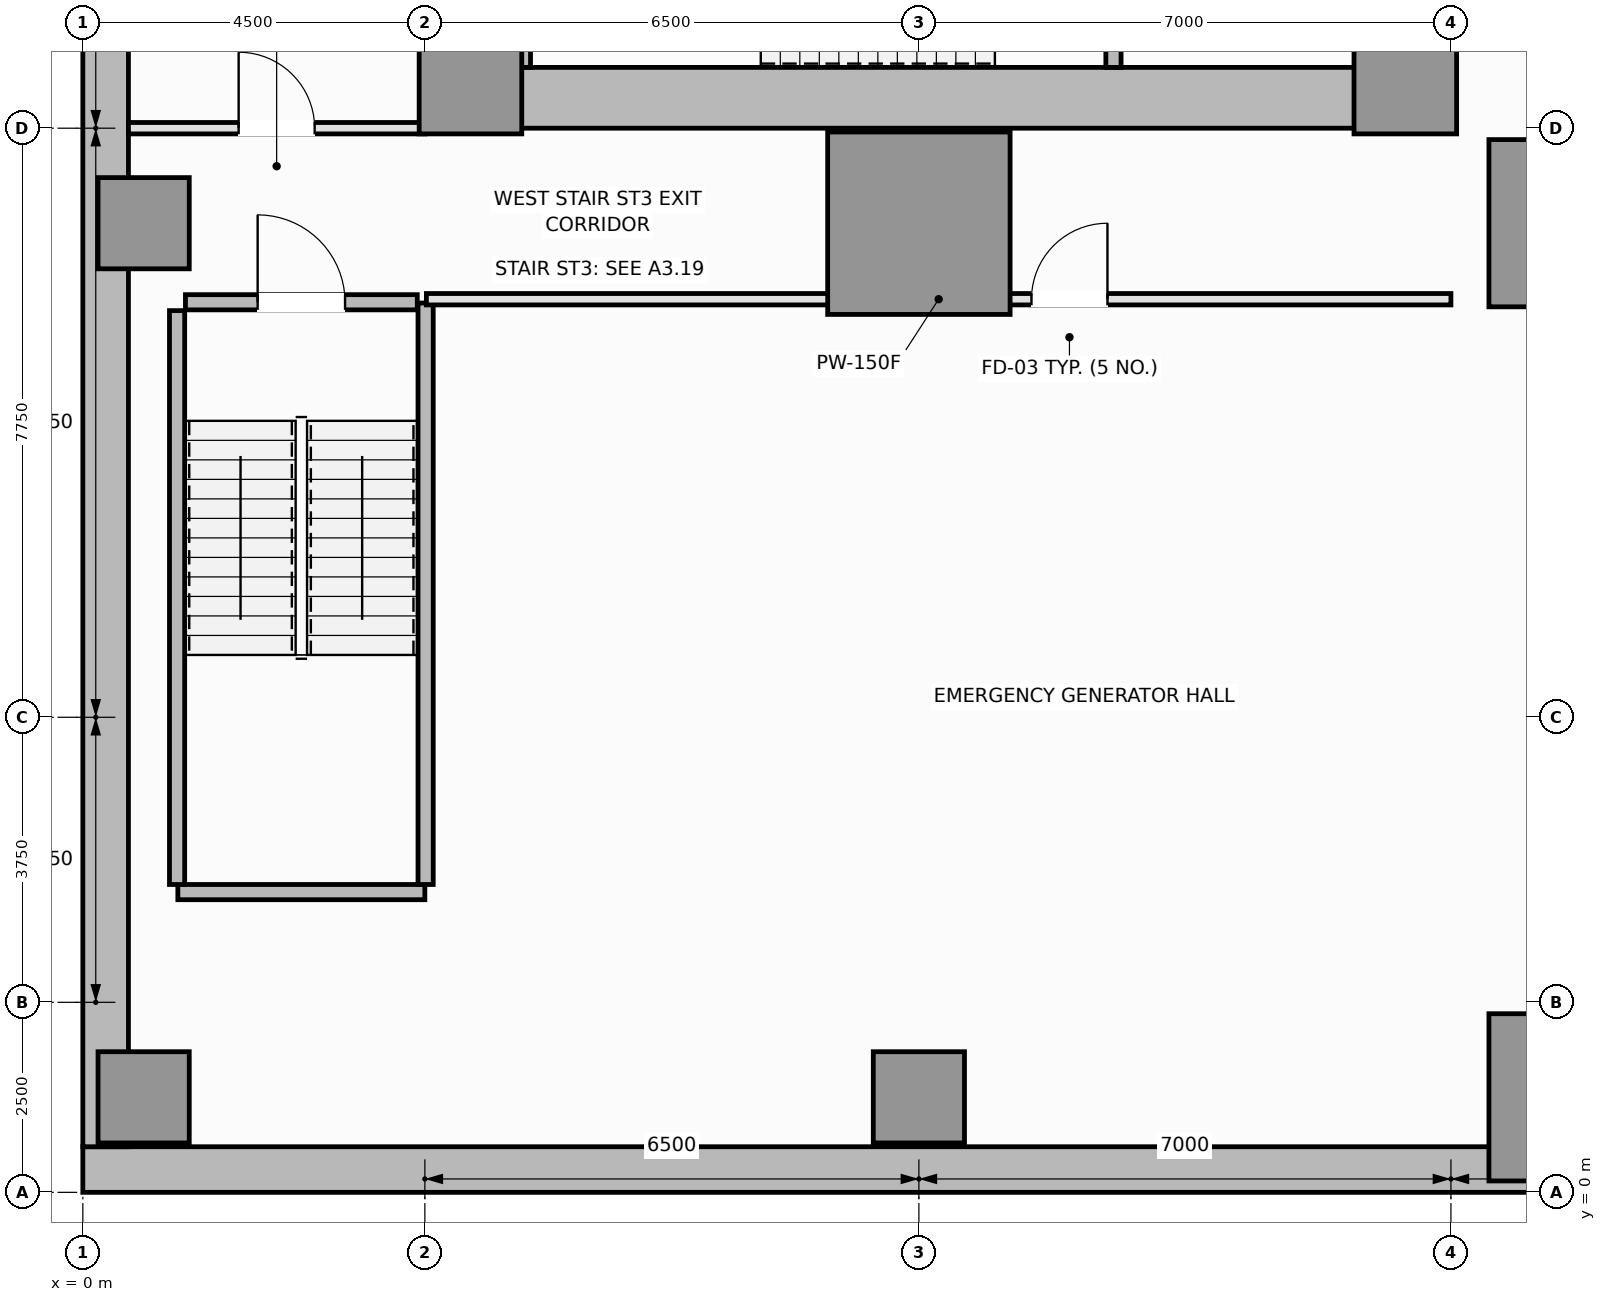
"""IFC4 building model, lengths in metres.
Left out: names, types, materials, properties, quantities, classifications, styles, units other than length and angle.
Written with IfcOpenShell. Run it as: python <this file> out.ifc"""

import sys

from ifc_helpers import new_model, si_unit, direction, frame, frame_2d, origin, origin_2d, place, context, subcontext, project, spatial, rectangle, extrude, element, fill, save


model = new_model("IFC4")
c1 = context("Model", 3, precision=1e-05, world=origin(), true_north=direction((0.0, 1.0)))
c2 = subcontext(c1, "Body", "Model", "MODEL_VIEW")
j1 = project(units=[si_unit("LENGTHUNIT", "METRE"), si_unit("PLANEANGLEUNIT", "RADIAN")], contexts=[c1])
p1 = place(None, origin())
s1 = spatial("IfcSite", under=j1, at=p1, CompositionType="ELEMENT")
p2 = place(p1, origin())
s2 = spatial("IfcBuilding", under=s1, at=p2, CompositionType="ELEMENT")
p3 = place(p2, frame((0.0, 0.0, -13.2)))
s3 = spatial("IfcBuildingStorey", under=s2, at=p3, CompositionType="ELEMENT", Elevation=-13.2)
p4 = place(p3, frame((0.0, 0.3, 0.0), z_axis=(0.0, 0.0, 1.0), x_axis=(1.0, 0.0, 0.0)))
e1 = element("IfcWall", 1, at=p4, inside=s3, PredefinedType="USERDEFINED", context=c2, shape_type="SweptSolid", body=[
    extrude(rectangle(XDim=58.0, YDim=0.6, at=frame_2d((29.0, 0.0))), origin(), (0.0, 0.0, 1.0), 4.2),
])
p5 = place(p3, frame((0.3, 0.6, 0.0), z_axis=(0.0, 0.0, 1.0), x_axis=(0.0, 1.0, 0.0)))
e2 = element("IfcWall", 2, at=p5, inside=s3, PredefinedType="USERDEFINED", context=c2, shape_type="SweptSolid", body=[
    extrude(rectangle(XDim=49.3, YDim=0.6, at=frame_2d((24.65, 0.0))), origin(), (0.0, 0.0, 1.0), 4.2),
])
p6 = place(p3, frame((4.5, 14.4, 0.0), z_axis=(0.0, 0.0, 1.0), x_axis=(1.0, 0.0, 0.0)))
e3 = element("IfcWall", 3, at=p6, inside=s3, PredefinedType="SHEAR", context=c2, shape_type="SweptSolid", body=[
    extrude(rectangle(XDim=13.5, YDim=0.8, at=frame_2d((6.75, 0.0))), origin(), (0.0, 0.0, 1.0), 4.2),
])
p7 = place(p3, frame((4.9, 14.8, 0.0), z_axis=(0.0, 0.0, 1.0), x_axis=(0.0, 1.0, 0.0)))
e4 = element("IfcWall", 4, at=p7, inside=s3, PredefinedType="SHEAR", context=c2, shape_type="SweptSolid", body=[
    extrude(rectangle(XDim=20.9, YDim=0.8, at=frame_2d((10.45, 0.0))), origin(), (0.0, 0.0, 1.0), 4.2),
])
p8 = place(p3, frame((17.6, 14.8, 0.0), z_axis=(0.0, 0.0, 1.0), x_axis=(0.0, 1.0, 0.0)))
e5 = element("IfcWall", 5, at=p8, inside=s3, PredefinedType="SHEAR", context=c2, shape_type="SweptSolid", body=[
    extrude(rectangle(XDim=8.65, YDim=0.8, at=frame_2d((4.325, 0.0))), origin(), (0.0, 0.0, 1.0), 4.2),
])
p9 = place(p8, frame((4.1, 0.0, 0.0)))
e6 = element("IfcOpeningElement", 6, at=p9, cuts=e5, PredefinedType="OPENING", context=c2, shape_type="SweptSolid", body=[
    extrude(rectangle(XDim=1.1, YDim=2.15, at=frame_2d((0.55, 1.075))), frame((0.0, 0.41, 0.0), z_axis=(0.0, -1.0, 0.0), x_axis=(1.0, 0.0, 0.0)), (0.0, 0.0, 1.0), 0.82),
])
for number, where, z_axis, x_axis in (
    (7, (5.1, 14.6, 0.0), (0.0, 0.0, 1.0), (1.0, 0.0, 0.0)),
    (8, (17.4, 14.6, 0.0), (0.0, 0.0, 1.0), (1.0, 0.0, 0.0)),
):
    element("IfcColumn", number, at=place(p3, frame(where, z_axis=z_axis, x_axis=x_axis)), inside=s3, PredefinedType="PILASTER", context=c2, shape_type="SweptSolid", body=[
        extrude(rectangle(XDim=1.35, YDim=1.35, at=origin_2d()), origin(), (0.0, 0.0, 1.0), 4.2),
    ])
p10 = place(p3, frame((11.0, 12.75, 0.0), z_axis=(0.0, 0.0, 1.0), x_axis=(1.0, 0.0, 0.0)))
e9 = element("IfcColumn", 9, at=p10, inside=s3, PredefinedType="COLUMN", context=c2, shape_type="SweptSolid", body=[
    extrude(rectangle(XDim=2.4, YDim=2.4, at=origin_2d()), origin(), (0.0, 0.0, 1.0), 4.2),
])
for number, where, z_axis, x_axis in (
    (10, (19.8, 1.25, 0.0), (0.0, 0.0, 1.0), (1.0, 0.0, 0.0)),
    (11, (19.8, 12.75, 0.0), (0.0, 0.0, 1.0), (1.0, 0.0, 0.0)),
):
    element("IfcColumn", number, at=place(p3, frame(where, z_axis=z_axis, x_axis=x_axis)), inside=s3, PredefinedType="COLUMN", context=c2, shape_type="SweptSolid", body=[
        extrude(rectangle(XDim=2.6, YDim=2.2, at=origin_2d()), origin(), (0.0, 0.0, 1.0), 4.2),
    ])
for number, where, z_axis, x_axis in (
    (12, (0.8, 1.25, 0.0), (0.0, 0.0, 1.0), (1.0, 0.0, 0.0)),
    (13, (0.8, 12.75, 0.0), (0.0, 0.0, 1.0), (1.0, 0.0, 0.0)),
    (14, (11.0, 1.25, 0.0), (0.0, 0.0, 1.0), (1.0, 0.0, 0.0)),
):
    element("IfcColumn", number, at=place(p3, frame(where, z_axis=z_axis, x_axis=x_axis)), inside=s3, PredefinedType="COLUMN", context=c2, shape_type="SweptSolid", body=[
        extrude(rectangle(XDim=1.2, YDim=1.2, at=origin_2d()), origin(), (0.0, 0.0, 1.0), 4.2),
    ])
p11 = place(p3, frame((5.79, 14.8, 0.0), z_axis=(0.0, 0.0, 1.0), x_axis=(0.0, 1.0, 0.0)))
e15 = element("IfcWall", 15, at=p11, inside=s3, PredefinedType="SOLIDWALL", context=c2, shape_type="SweptSolid", body=[
    extrude(rectangle(XDim=3.05, YDim=0.2, at=frame_2d((1.525, 0.0))), origin(), (0.0, 0.0, 1.0), 4.2),
])
p12 = place(p3, frame((13.56, 14.8, 0.0), z_axis=(0.0, 0.0, 1.0), x_axis=(0.0, 1.0, 0.0)))
e16 = element("IfcWall", 16, at=p12, inside=s3, PredefinedType="SOLIDWALL", context=c2, shape_type="SweptSolid", body=[
    extrude(rectangle(XDim=3.05, YDim=0.2, at=frame_2d((1.525, 0.0))), origin(), (0.0, 0.0, 1.0), 4.2),
])
p13 = place(p12, frame((0.95, 0.0, 0.0)))
e17 = element("IfcOpeningElement", 17, at=p13, cuts=e16, PredefinedType="OPENING", context=c2, shape_type="SweptSolid", body=[
    extrude(rectangle(XDim=1.15, YDim=2.15, at=frame_2d((0.575, 1.075))), frame((0.0, 0.11, 0.0), z_axis=(0.0, -1.0, 0.0), x_axis=(1.0, 0.0, 0.0)), (0.0, 0.0, 1.0), 0.22),
])
p14 = place(p3, frame((1.25, 3.95, 0.0), z_axis=(0.0, 0.0, 1.0), x_axis=(1.0, 0.0, 0.0)))
e18 = element("IfcWall", 18, at=p14, inside=s3, PredefinedType="SOLIDWALL", context=c2, shape_type="SweptSolid", body=[
    extrude(rectangle(XDim=3.25, YDim=0.2, at=frame_2d((1.625, 0.0))), origin(), (0.0, 0.0, 1.0), 4.2),
])
p15 = place(p3, frame((1.24, 4.05, 0.0), z_axis=(0.0, 0.0, 1.0), x_axis=(0.0, 1.0, 0.0)))
e19 = element("IfcWall", 19, at=p15, inside=s3, PredefinedType="SOLIDWALL", context=c2, shape_type="SweptSolid", body=[
    extrude(rectangle(XDim=7.55, YDim=0.2, at=frame_2d((3.775, 0.0))), origin(), (0.0, 0.0, 1.0), 4.2),
])
p16 = place(p3, frame((4.51, 4.05, 0.0), z_axis=(0.0, 0.0, 1.0), x_axis=(0.0, 1.0, 0.0)))
e20 = element("IfcWall", 20, at=p16, inside=s3, PredefinedType="SOLIDWALL", context=c2, shape_type="SweptSolid", body=[
    extrude(rectangle(XDim=7.65, YDim=0.2, at=frame_2d((3.825, 0.0))), origin(), (0.0, 0.0, 1.0), 4.2),
])
p17 = place(p3, frame((1.35, 11.71, 0.0), z_axis=(0.0, 0.0, 1.0), x_axis=(1.0, 0.0, 0.0)))
e21 = element("IfcWall", 21, at=p17, inside=s3, PredefinedType="SOLIDWALL", context=c2, shape_type="SweptSolid", body=[
    extrude(rectangle(XDim=3.05, YDim=0.2, at=frame_2d((1.525, 0.0))), origin(), (0.0, 0.0, 1.0), 4.2),
])
p18 = place(p17, frame((0.95, 0.0, 0.0)))
e22 = element("IfcOpeningElement", 22, at=p18, cuts=e21, PredefinedType="OPENING", context=c2, shape_type="SweptSolid", body=[
    extrude(rectangle(XDim=1.15, YDim=2.15, at=frame_2d((0.575, 1.075))), frame((0.0, 0.11, 0.0), z_axis=(0.0, -1.0, 0.0), x_axis=(1.0, 0.0, 0.0)), (0.0, 0.0, 1.0), 0.22),
])
p19 = place(p3, frame((4.52, 11.75, 0.0), z_axis=(0.0, 0.0, 1.0), x_axis=(1.0, 0.0, 0.0)))
e23 = element("IfcWall", 23, at=p19, inside=s3, PredefinedType="PARTITIONING", context=c2, shape_type="SweptSolid", body=[
    extrude(rectangle(XDim=13.48, YDim=0.15, at=frame_2d((6.74, 0.0))), origin(), (0.0, 0.0, 1.0), 4.0),
])
p20 = place(p19, frame((7.961, 0.0, 0.0)))
e24 = element("IfcOpeningElement", 24, at=p20, cuts=e23, PredefinedType="OPENING", context=c2, shape_type="SweptSolid", body=[
    extrude(rectangle(XDim=1.0, YDim=2.15, at=frame_2d((0.5, 1.075))), frame((0.0, 0.085, 0.0), z_axis=(0.0, -1.0, 0.0), x_axis=(1.0, 0.0, 0.0)), (0.0, 0.0, 1.0), 0.17),
])
p21 = place(p3, frame((0.6, 14.0, 0.0), z_axis=(0.0, 0.0, 1.0), x_axis=(1.0, 0.0, 0.0)))
e25 = element("IfcWall", 25, at=p21, inside=s3, PredefinedType="PARTITIONING", context=c2, shape_type="SweptSolid", body=[
    extrude(rectangle(XDim=3.9, YDim=0.15, at=frame_2d((1.95, 0.0))), origin(), (0.0, 0.0, 1.0), 4.0),
])
p22 = place(p21, frame((1.45, 0.0, 0.0)))
e26 = element("IfcOpeningElement", 26, at=p22, cuts=e25, PredefinedType="OPENING", context=c2, shape_type="SweptSolid", body=[
    extrude(rectangle(XDim=1.0, YDim=2.15, at=frame_2d((0.5, 1.075))), frame((0.0, 0.085, 0.0), z_axis=(0.0, -1.0, 0.0), x_axis=(1.0, 0.0, 0.0)), (0.0, 0.0, 1.0), 0.17),
])
p23 = place(p18, origin())
e27 = element("IfcDoor", 27, at=p23, inside=s3, OperationType="SINGLE_SWING_LEFT", PredefinedType="DOOR", context=c2, shape_type="SweptSolid", body=[
    extrude(rectangle(XDim=1.15, YDim=2.15, at=frame_2d((0.575, 1.075))), frame((0.0, 0.025, 0.0), z_axis=(0.0, -1.0, 0.0), x_axis=(1.0, 0.0, 0.0)), (0.0, 0.0, 1.0), 0.05),
])
fill(e22, e27)
p24 = place(p20, origin())
e28 = element("IfcDoor", 28, at=p24, inside=s3, OperationType="SINGLE_SWING_RIGHT", PredefinedType="DOOR", context=c2, shape_type="SweptSolid", body=[
    extrude(rectangle(XDim=1.0, YDim=2.15, at=frame_2d((0.5, 1.075))), frame((0.0, 0.025, 0.0), z_axis=(0.0, -1.0, 0.0), x_axis=(1.0, 0.0, 0.0)), (0.0, 0.0, 1.0), 0.05),
])
fill(e24, e28)
p25 = place(p22, origin())
e29 = element("IfcDoor", 29, at=p25, inside=s3, OperationType="SINGLE_SWING_LEFT", PredefinedType="DOOR", context=c2, shape_type="SweptSolid", body=[
    extrude(rectangle(XDim=1.0, YDim=2.15, at=frame_2d((0.5, 1.075))), frame((0.0, 0.025, 0.0), z_axis=(0.0, -1.0, 0.0), x_axis=(1.0, 0.0, 0.0)), (0.0, 0.0, 1.0), 0.05),
])
fill(e26, e29)
save(model, sys.argv[1])
